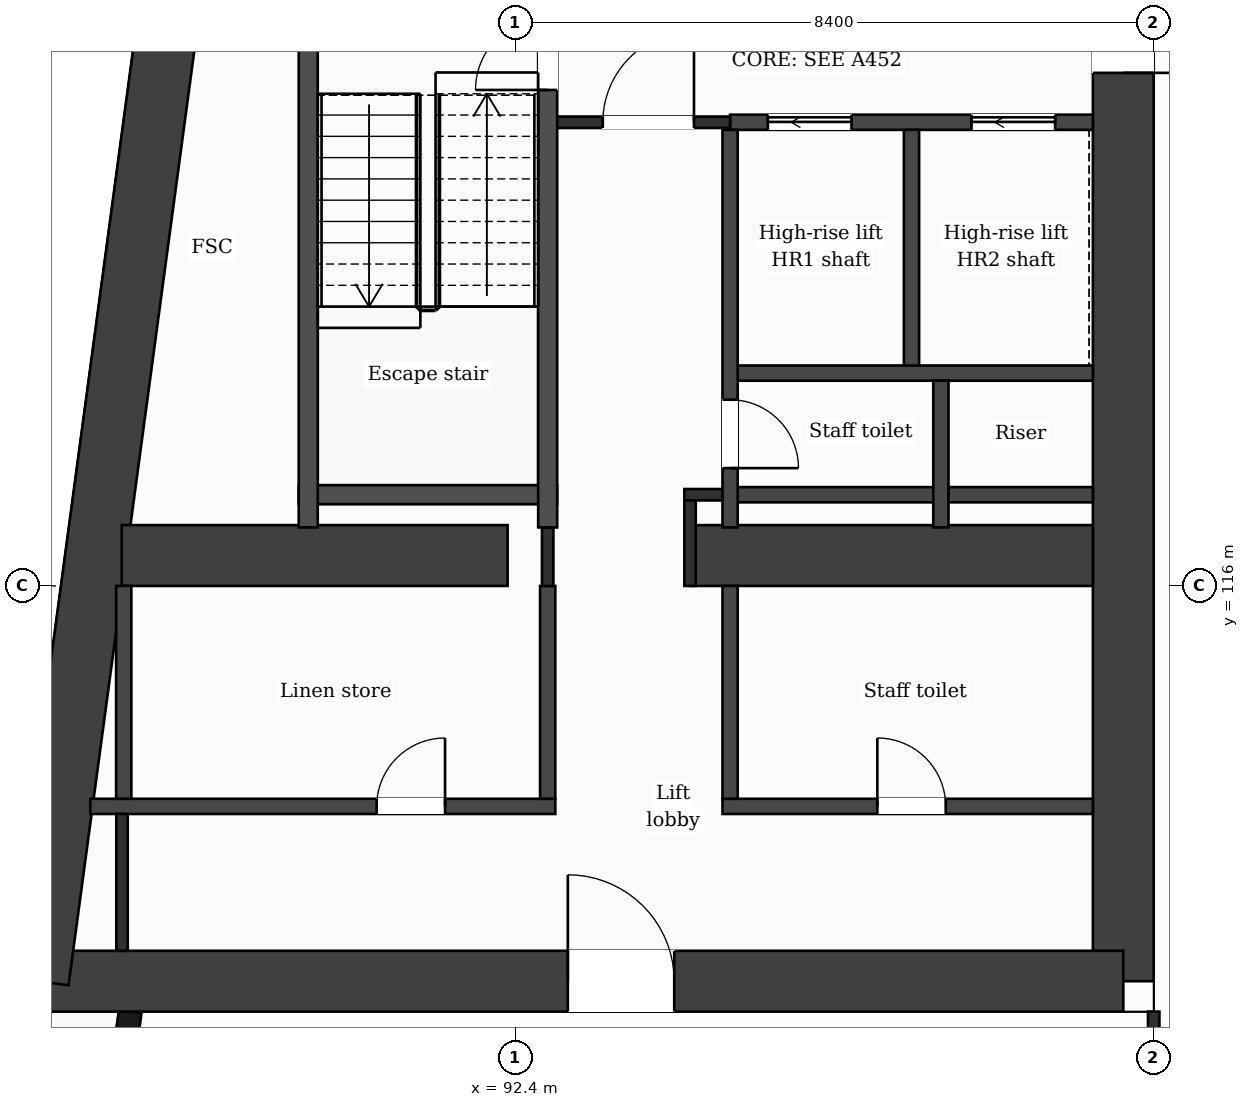
"""IFC4 building model, lengths in metres.
Left out: names, types, materials, properties, quantities, classifications, styles, units other than length and angle.
Written with IfcOpenShell. Run it as: python <this file> out.ifc"""

import sys

from ifc_helpers import new_model, si_unit, direction, frame, frame_2d, origin, place, context, subcontext, project, spatial, rectangle, extrude, element, fill, save


model = new_model("IFC4")
c1 = context("Model", 3, precision=1e-05, world=origin(), true_north=direction((0.0, 1.0)))
c2 = subcontext(c1, "Body", "Model", "MODEL_VIEW")
j1 = project(units=[si_unit("LENGTHUNIT", "METRE"), si_unit("PLANEANGLEUNIT", "RADIAN")], contexts=[c1])
p1 = place(None, origin())
s1 = spatial("IfcSite", under=j1, at=p1, CompositionType="ELEMENT")
p2 = place(p1, origin())
s2 = spatial("IfcBuilding", under=s1, at=p2, CompositionType="ELEMENT")
p3 = place(p2, frame((0.0, 0.0, 213.3)))
s3 = spatial("IfcBuildingStorey", under=s2, at=p3, CompositionType="ELEMENT", Elevation=213.3)
p4 = place(p3, frame((100.4, 132.0, 0.0), z_axis=(0.0, 0.0, 1.0), x_axis=(0.0, -1.0, 0.0)))
e1 = element("IfcWall", 1, at=p4, inside=s3, PredefinedType="SHEAR", context=c2, shape_type="SweptSolid", body=[
    extrude(rectangle(XDim=21.2, YDim=0.8, at=frame_2d((10.6, 0.0))), origin(), (0.0, 0.0, 1.0), 3.7),
])
p5 = place(p4, frame((7.85, 0.0, 0.0)))
e2 = element("IfcOpeningElement", 2, at=p5, cuts=e1, PredefinedType="OPENING", context=c2, shape_type="SweptSolid", body=[
    extrude(rectangle(XDim=1.4, YDim=2.1, at=frame_2d((0.7, 1.05))), frame((0.0, 0.41, 0.0), z_axis=(0.0, -1.0, 0.0), x_axis=(1.0, 0.0, 0.0)), (0.0, 0.0, 1.0), 0.82),
])
p6 = place(p3, frame((100.4, 110.8, 0.0), z_axis=(0.0, 0.0, 1.0), x_axis=(-1.0, 0.0, 0.0)))
e3 = element("IfcWall", 3, at=p6, inside=s3, PredefinedType="SHEAR", context=c2, shape_type="SweptSolid", body=[
    extrude(rectangle(XDim=14.273, YDim=0.8, at=frame_2d((7.137, 0.0))), origin(), (0.0, 0.0, 1.0), 3.7),
])
p7 = place(p6, frame((5.908, 0.0, 0.0)))
e4 = element("IfcOpeningElement", 4, at=p7, cuts=e3, PredefinedType="OPENING", context=c2, shape_type="SweptSolid", body=[
    extrude(rectangle(XDim=1.4, YDim=2.1, at=frame_2d((0.7, 1.05))), frame((0.0, 0.41, 0.0), z_axis=(0.0, -1.0, 0.0), x_axis=(1.0, 0.0, 0.0)), (0.0, 0.0, 1.0), 0.82),
])
p8 = place(p3, frame((86.127, 110.8, 0.0), z_axis=(0.0, 0.0, 1.0), x_axis=(0.133408347329, 0.991061154956, 0.0)))
e5 = element("IfcWall", 5, at=p8, inside=s3, PredefinedType="SHEAR", context=c2, shape_type="SweptSolid", body=[
    extrude(rectangle(XDim=21.391, YDim=0.8, at=frame_2d((10.696, 0.0))), origin(), (0.0, 0.0, 1.0), 3.7),
])
p9 = place(p3, frame((87.223, 116.4, 0.0), z_axis=(0.0, 0.0, 1.0), x_axis=(1.0, 0.0, 0.0)))
e6 = element("IfcWall", 6, at=p9, inside=s3, PredefinedType="SHEAR", context=c2, shape_type="SweptSolid", body=[
    extrude(rectangle(XDim=5.077, YDim=0.8, at=frame_2d((2.539, 0.0))), origin(), (0.0, 0.0, 1.0), 3.7),
])
p10 = place(p3, frame((94.7, 116.4, 0.0), z_axis=(0.0, 0.0, 1.0), x_axis=(1.0, 0.0, 0.0)))
e7 = element("IfcWall", 7, at=p10, inside=s3, PredefinedType="SHEAR", context=c2, shape_type="SweptSolid", body=[
    extrude(rectangle(XDim=5.3, YDim=0.8, at=frame_2d((2.65, 0.0))), origin(), (0.0, 0.0, 1.0), 3.7),
])
p11 = place(p3, frame((87.334, 110.4, 0.0), z_axis=(0.0, 0.0, 1.0), x_axis=(-0.133437175554, -0.991057273915, 0.0)))
e8 = element("IfcWall", 8, at=p11, inside=s3, PredefinedType="SOLIDWALL", context=c2, shape_type="SweptSolid", body=[
    extrude(rectangle(XDim=6.781, YDim=0.3, at=frame_2d((3.39, 0.0))), origin(), (0.0, 0.0, 1.0), 3.38),
])
p12 = place(p11, frame((1.418, 0.0, 0.0)))
e9 = element("IfcOpeningElement", 9, at=p12, cuts=e8, PredefinedType="OPENING", context=c2, shape_type="SweptSolid", body=[
    extrude(rectangle(XDim=1.2, YDim=2.4, at=frame_2d((0.6, 1.2))), frame((0.0, 0.16, 0.0), z_axis=(0.0, -1.0, 0.0), x_axis=(1.0, 0.0, 0.0)), (0.0, 0.0, 1.0), 0.32),
])
p13 = place(p11, frame((4.758, 0.0, 0.9)))
e10 = element("IfcOpeningElement", 10, at=p13, cuts=e8, PredefinedType="OPENING", context=c2, shape_type="SweptSolid", body=[
    extrude(rectangle(XDim=1.2, YDim=2.1, at=frame_2d((0.6, 1.05))), frame((0.0, 0.16, 0.0), z_axis=(0.0, -1.0, 0.0), x_axis=(1.0, 0.0, 0.0)), (0.0, 0.0, 1.0), 0.32),
])
p14 = place(p3, frame((86.81, 113.1, 0.0), z_axis=(0.0, 0.0, 1.0), x_axis=(1.0, 0.0, 0.0)))
e11 = element("IfcWall", 11, at=p14, inside=s3, PredefinedType="PARTITIONING", context=c2, shape_type="SweptSolid", body=[
    extrude(rectangle(XDim=6.117, YDim=0.2, at=frame_2d((3.059, 0.0))), origin(), (0.0, 0.0, 1.0), 3.38),
])
p15 = place(p14, frame((3.767, 0.0, 0.0)))
e12 = element("IfcOpeningElement", 12, at=p15, cuts=e11, PredefinedType="OPENING", context=c2, shape_type="SweptSolid", body=[
    extrude(rectangle(XDim=0.9, YDim=2.1, at=frame_2d((0.45, 1.05))), frame((0.0, 0.11, 0.0), z_axis=(0.0, -1.0, 0.0), x_axis=(1.0, 0.0, 0.0)), (0.0, 0.0, 1.0), 0.22),
])
p16 = place(p3, frame((95.127, 113.1, 0.0), z_axis=(0.0, 0.0, 1.0), x_axis=(1.0, 0.0, 0.0)))
e13 = element("IfcWall", 13, at=p16, inside=s3, PredefinedType="PARTITIONING", context=c2, shape_type="SweptSolid", body=[
    extrude(rectangle(XDim=4.873, YDim=0.2, at=frame_2d((2.437, 0.0))), origin(), (0.0, 0.0, 1.0), 3.38),
])
p17 = place(p16, frame((2.037, 0.0, 0.0)))
e14 = element("IfcOpeningElement", 14, at=p17, cuts=e13, PredefinedType="OPENING", context=c2, shape_type="SweptSolid", body=[
    extrude(rectangle(XDim=0.9, YDim=2.1, at=frame_2d((0.45, 1.05))), frame((0.0, 0.11, 0.0), z_axis=(0.0, -1.0, 0.0), x_axis=(1.0, 0.0, 0.0)), (0.0, 0.0, 1.0), 0.22),
])
p18 = place(p3, frame((95.227, 117.2, 0.0), z_axis=(0.0, 0.0, 1.0), x_axis=(1.0, 0.0, 0.0)))
e15 = element("IfcWall", 15, at=p18, inside=s3, PredefinedType="PARTITIONING", context=c2, shape_type="SweptSolid", body=[
    extrude(rectangle(XDim=4.773, YDim=0.2, at=frame_2d((2.386, 0.0))), origin(), (0.0, 0.0, 1.0), 3.38),
])
p19 = place(p3, frame((94.625, 117.2, 0.0), z_axis=(0.0, 0.0, 1.0), x_axis=(1.0, 0.0, 0.0)))
e16 = element("IfcWall", 16, at=p19, inside=s3, PredefinedType="PARTITIONING", context=c2, shape_type="SweptSolid", body=[
    extrude(rectangle(XDim=0.602, YDim=0.15, at=frame_2d((0.301, 0.0))), origin(), (0.0, 0.0, 1.0), 3.38),
])
p20 = place(p3, frame((89.552, 117.2, 0.0), z_axis=(0.0, 0.0, 1.0), x_axis=(1.0, 0.0, 0.0)))
e17 = element("IfcWall", 17, at=p20, inside=s3, PredefinedType="PARTITIONING", context=c2, shape_type="SweptSolid", body=[
    extrude(rectangle(XDim=3.4, YDim=0.25, at=frame_2d((1.7, 0.0))), origin(), (0.0, 0.0, 1.0), 3.38),
])
p21 = place(p3, frame((95.227, 118.8, 0.0), z_axis=(0.0, 0.0, 1.0), x_axis=(1.0, 0.0, 0.0)))
e18 = element("IfcWall", 18, at=p21, inside=s3, PredefinedType="PARTITIONING", context=c2, shape_type="SweptSolid", body=[
    extrude(rectangle(XDim=4.773, YDim=0.2, at=frame_2d((2.386, 0.0))), origin(), (0.0, 0.0, 1.0), 3.38),
])
p22 = place(p3, frame((95.227, 122.1, 0.0), z_axis=(0.0, 0.0, 1.0), x_axis=(1.0, 0.0, 0.0)))
e19 = element("IfcWall", 19, at=p22, inside=s3, PredefinedType="PARTITIONING", context=c2, shape_type="SweptSolid", body=[
    extrude(rectangle(XDim=4.773, YDim=0.2, at=frame_2d((2.386, 0.0))), origin(), (0.0, 0.0, 1.0), 3.38),
])
p23 = place(p22, frame((0.497, 0.0, 0.0)))
e20 = element("IfcOpeningElement", 20, at=p23, cuts=e19, PredefinedType="OPENING", context=c2, shape_type="SweptSolid", body=[
    extrude(rectangle(XDim=1.1, YDim=2.1, at=frame_2d((0.55, 1.05))), frame((0.0, 0.11, 0.0), z_axis=(0.0, -1.0, 0.0), x_axis=(1.0, 0.0, 0.0)), (0.0, 0.0, 1.0), 0.22),
])
p24 = place(p22, frame((3.176, 0.0, 0.0)))
e21 = element("IfcOpeningElement", 21, at=p24, cuts=e19, PredefinedType="OPENING", context=c2, shape_type="SweptSolid", body=[
    extrude(rectangle(XDim=1.1, YDim=2.1, at=frame_2d((0.55, 1.05))), frame((0.0, 0.11, 0.0), z_axis=(0.0, -1.0, 0.0), x_axis=(1.0, 0.0, 0.0)), (0.0, 0.0, 1.0), 0.22),
])
p25 = place(p3, frame((92.827, 122.1, 0.0), z_axis=(0.0, 0.0, 1.0), x_axis=(1.0, 0.0, 0.0)))
e22 = element("IfcWall", 22, at=p25, inside=s3, PredefinedType="PARTITIONING", context=c2, shape_type="SweptSolid", body=[
    extrude(rectangle(XDim=2.4, YDim=0.15, at=frame_2d((1.2, 0.0))), origin(), (0.0, 0.0, 1.0), 3.38),
])
p26 = place(p25, frame((0.725, 0.0, 0.0)))
e23 = element("IfcOpeningElement", 23, at=p26, cuts=e22, PredefinedType="OPENING", context=c2, shape_type="SweptSolid", body=[
    extrude(rectangle(XDim=1.2, YDim=2.1, at=frame_2d((0.6, 1.05))), frame((0.0, 0.085, 0.0), z_axis=(0.0, -1.0, 0.0), x_axis=(1.0, 0.0, 0.0)), (0.0, 0.0, 1.0), 0.17),
])
p27 = place(p3, frame((87.25, 113.2, 0.0), z_axis=(0.0, 0.0, 1.0), x_axis=(0.0, 1.0, 0.0)))
e24 = element("IfcWall", 24, at=p27, inside=s3, PredefinedType="PARTITIONING", context=c2, shape_type="SweptSolid", body=[
    extrude(rectangle(XDim=2.8, YDim=0.2, at=frame_2d((1.4, 0.0))), origin(), (0.0, 0.0, 1.0), 3.38),
])
p28 = place(p3, frame((87.227, 111.2, 0.0), z_axis=(0.0, 0.0, 1.0), x_axis=(0.0, 1.0, 0.0)))
e25 = element("IfcWall", 25, at=p28, inside=s3, PredefinedType="PARTITIONING", context=c2, shape_type="SweptSolid", body=[
    extrude(rectangle(XDim=1.8, YDim=0.15, at=frame_2d((0.9, 0.0))), origin(), (0.0, 0.0, 1.0), 3.38),
])
p29 = place(p3, frame((89.677, 116.77, 0.0), z_axis=(0.0, 0.0, 1.0), x_axis=(0.0, 1.0, 0.0)))
e26 = element("IfcWall", 26, at=p29, inside=s3, PredefinedType="PARTITIONING", context=c2, shape_type="SweptSolid", body=[
    extrude(rectangle(XDim=7.055, YDim=0.25, at=frame_2d((3.527, 0.0))), origin(), (0.0, 0.0, 1.0), 3.38),
])
p30 = place(p3, frame((92.827, 113.2, 0.0), z_axis=(0.0, 0.0, 1.0), x_axis=(0.0, 1.0, 0.0)))
e27 = element("IfcWall", 27, at=p30, inside=s3, PredefinedType="PARTITIONING", context=c2, shape_type="SweptSolid", body=[
    extrude(rectangle(XDim=2.8, YDim=0.2, at=frame_2d((1.4, 0.0))), origin(), (0.0, 0.0, 1.0), 3.38),
])
p31 = place(p3, frame((92.827, 116.0, 0.0), z_axis=(0.0, 0.0, 1.0), x_axis=(0.0, 1.0, 0.0)))
e28 = element("IfcWall", 28, at=p31, inside=s3, PredefinedType="PARTITIONING", context=c2, shape_type="SweptSolid", body=[
    extrude(rectangle(XDim=0.77, YDim=0.15, at=frame_2d((0.385, 0.0))), origin(), (0.0, 0.0, 1.0), 3.38),
])
p32 = place(p3, frame((92.827, 116.77, 0.0), z_axis=(0.0, 0.0, 1.0), x_axis=(0.0, 1.0, 0.0)))
e29 = element("IfcWall", 29, at=p32, inside=s3, PredefinedType="PARTITIONING", context=c2, shape_type="SweptSolid", body=[
    extrude(rectangle(XDim=7.055, YDim=0.25, at=frame_2d((3.527, 0.0))), origin(), (0.0, 0.0, 1.0), 3.38),
])
p33 = place(p32, frame((5.755, 0.0, 0.0)))
e30 = element("IfcOpeningElement", 30, at=p33, cuts=e29, PredefinedType="OPENING", context=c2, shape_type="SweptSolid", body=[
    extrude(rectangle(XDim=0.95, YDim=2.1, at=frame_2d((0.475, 1.05))), frame((0.0, 0.135, 0.0), z_axis=(0.0, -1.0, 0.0), x_axis=(1.0, 0.0, 0.0)), (0.0, 0.0, 1.0), 0.27),
])
p34 = place(p3, frame((94.7, 116.0, 0.0), z_axis=(0.0, 0.0, 1.0), x_axis=(0.0, 1.0, 0.0)))
e31 = element("IfcWall", 31, at=p34, inside=s3, PredefinedType="PARTITIONING", context=c2, shape_type="SweptSolid", body=[
    extrude(rectangle(XDim=1.125, YDim=0.15, at=frame_2d((0.562, 0.0))), origin(), (0.0, 0.0, 1.0), 3.38),
])
p35 = place(p3, frame((95.227, 113.2, 0.0), z_axis=(0.0, 0.0, 1.0), x_axis=(0.0, 1.0, 0.0)))
e32 = element("IfcWall", 32, at=p35, inside=s3, PredefinedType="PARTITIONING", context=c2, shape_type="SweptSolid", body=[
    extrude(rectangle(XDim=2.8, YDim=0.2, at=frame_2d((1.4, 0.0))), origin(), (0.0, 0.0, 1.0), 3.38),
])
p36 = place(p3, frame((95.227, 116.77, 0.0), z_axis=(0.0, 0.0, 1.0), x_axis=(0.0, 1.0, 0.0)))
e33 = element("IfcWall", 33, at=p36, inside=s3, PredefinedType="PARTITIONING", context=c2, shape_type="SweptSolid", body=[
    extrude(rectangle(XDim=5.23, YDim=0.2, at=frame_2d((2.615, 0.0))), origin(), (0.0, 0.0, 1.0), 3.38),
])
p37 = place(p36, frame((0.78, 0.0, 0.0)))
e34 = element("IfcOpeningElement", 34, at=p37, cuts=e33, PredefinedType="OPENING", context=c2, shape_type="SweptSolid", body=[
    extrude(rectangle(XDim=0.9, YDim=2.1, at=frame_2d((0.45, 1.05))), frame((0.0, 0.11, 0.0), z_axis=(0.0, -1.0, 0.0), x_axis=(1.0, 0.0, 0.0)), (0.0, 0.0, 1.0), 0.22),
])
p38 = place(p3, frame((97.614, 118.9, 0.0), z_axis=(0.0, 0.0, 1.0), x_axis=(0.0, 1.0, 0.0)))
e35 = element("IfcWall", 35, at=p38, inside=s3, PredefinedType="PARTITIONING", context=c2, shape_type="SweptSolid", body=[
    extrude(rectangle(XDim=3.1, YDim=0.2, at=frame_2d((1.55, 0.0))), origin(), (0.0, 0.0, 1.0), 3.38),
])
p39 = place(p3, frame((98.0, 116.77, 0.0), z_axis=(0.0, 0.0, 1.0), x_axis=(0.0, 1.0, 0.0)))
e36 = element("IfcWall", 36, at=p39, inside=s3, PredefinedType="PARTITIONING", context=c2, shape_type="SweptSolid", body=[
    extrude(rectangle(XDim=1.93, YDim=0.2, at=frame_2d((0.965, 0.0))), origin(), (0.0, 0.0, 1.0), 3.38),
])
p40 = place(p3, frame((100.8, 109.075, 0.0), z_axis=(0.0, 0.0, 1.0), x_axis=(0.0, 1.0, 0.0)))
e37 = element("IfcWall", 37, at=p40, inside=s3, PredefinedType="PARTITIONING", context=c2, shape_type="SweptSolid", body=[
    extrude(rectangle(XDim=1.325, YDim=0.15, at=frame_2d((0.663, 0.0))), origin(), (0.0, 0.0, 1.0), 3.38),
])
p41 = place(p26, origin())
e38 = element("IfcDoor", 38, at=p41, inside=s3, OperationType="SINGLE_SWING_RIGHT", PredefinedType="DOOR", context=c2, shape_type="SweptSolid", body=[
    extrude(rectangle(XDim=1.2, YDim=2.1, at=frame_2d((0.6, 1.05))), frame((0.0, 0.025, 0.0), z_axis=(0.0, -1.0, 0.0), x_axis=(1.0, 0.0, 0.0)), (0.0, 0.0, 1.0), 0.05),
])
fill(e23, e38)
p42 = place(p23, origin())
e39 = element("IfcDoor", 39, at=p42, inside=s3, OperationType="SLIDING_TO_LEFT", PredefinedType="DOOR", context=c2, shape_type="SweptSolid", body=[
    extrude(rectangle(XDim=1.1, YDim=2.1, at=frame_2d((0.55, 1.05))), frame((0.0, 0.025, 0.0), z_axis=(0.0, -1.0, 0.0), x_axis=(1.0, 0.0, 0.0)), (0.0, 0.0, 1.0), 0.05),
])
fill(e20, e39)
p43 = place(p24, origin())
e40 = element("IfcDoor", 40, at=p43, inside=s3, OperationType="SLIDING_TO_LEFT", PredefinedType="DOOR", context=c2, shape_type="SweptSolid", body=[
    extrude(rectangle(XDim=1.1, YDim=2.1, at=frame_2d((0.55, 1.05))), frame((0.0, 0.025, 0.0), z_axis=(0.0, -1.0, 0.0), x_axis=(1.0, 0.0, 0.0)), (0.0, 0.0, 1.0), 0.05),
])
fill(e21, e40)
p44 = place(p33, origin())
e41 = element("IfcDoor", 41, at=p44, inside=s3, OperationType="SINGLE_SWING_LEFT", PredefinedType="DOOR", context=c2, shape_type="SweptSolid", body=[
    extrude(rectangle(XDim=0.95, YDim=2.1, at=frame_2d((0.475, 1.05))), frame((0.0, 0.025, 0.0), z_axis=(0.0, -1.0, 0.0), x_axis=(1.0, 0.0, 0.0)), (0.0, 0.0, 1.0), 0.05),
])
fill(e30, e41)
p45 = place(p37, origin())
e42 = element("IfcDoor", 42, at=p45, inside=s3, OperationType="SINGLE_SWING_LEFT", PredefinedType="DOOR", context=c2, shape_type="SweptSolid", body=[
    extrude(rectangle(XDim=0.9, YDim=2.1, at=frame_2d((0.45, 1.05))), frame((0.0, 0.025, 0.0), z_axis=(0.0, -1.0, 0.0), x_axis=(1.0, 0.0, 0.0)), (0.0, 0.0, 1.0), 0.05),
])
fill(e34, e42)
p46 = place(p15, origin())
e43 = element("IfcDoor", 43, at=p46, inside=s3, OperationType="SINGLE_SWING_RIGHT", PredefinedType="DOOR", context=c2, shape_type="SweptSolid", body=[
    extrude(rectangle(XDim=0.9, YDim=2.1, at=frame_2d((0.45, 1.05))), frame((0.0, 0.025, 0.0), z_axis=(0.0, -1.0, 0.0), x_axis=(1.0, 0.0, 0.0)), (0.0, 0.0, 1.0), 0.05),
])
fill(e12, e43)
p47 = place(p17, origin())
e44 = element("IfcDoor", 44, at=p47, inside=s3, OperationType="SINGLE_SWING_LEFT", PredefinedType="DOOR", context=c2, shape_type="SweptSolid", body=[
    extrude(rectangle(XDim=0.9, YDim=2.1, at=frame_2d((0.45, 1.05))), frame((0.0, 0.025, 0.0), z_axis=(0.0, -1.0, 0.0), x_axis=(1.0, 0.0, 0.0)), (0.0, 0.0, 1.0), 0.05),
])
fill(e14, e44)
p48 = place(p7, origin())
e45 = element("IfcDoor", 45, at=p48, inside=s3, OperationType="SINGLE_SWING_RIGHT", PredefinedType="DOOR", context=c2, shape_type="SweptSolid", body=[
    extrude(rectangle(XDim=1.4, YDim=2.1, at=frame_2d((0.7, 1.05))), frame((0.0, 0.025, 0.0), z_axis=(0.0, -1.0, 0.0), x_axis=(1.0, 0.0, 0.0)), (0.0, 0.0, 1.0), 0.05),
])
fill(e4, e45)
p49 = place(p5, origin())
e46 = element("IfcDoor", 46, at=p49, inside=s3, OperationType="SINGLE_SWING_RIGHT", PredefinedType="DOOR", context=c2, shape_type="SweptSolid", body=[
    extrude(rectangle(XDim=1.4, YDim=2.1, at=frame_2d((0.7, 1.05))), frame((0.0, 0.025, 0.0), z_axis=(0.0, -1.0, 0.0), x_axis=(1.0, 0.0, 0.0)), (0.0, 0.0, 1.0), 0.05),
])
fill(e2, e46)
save(model, sys.argv[1])
